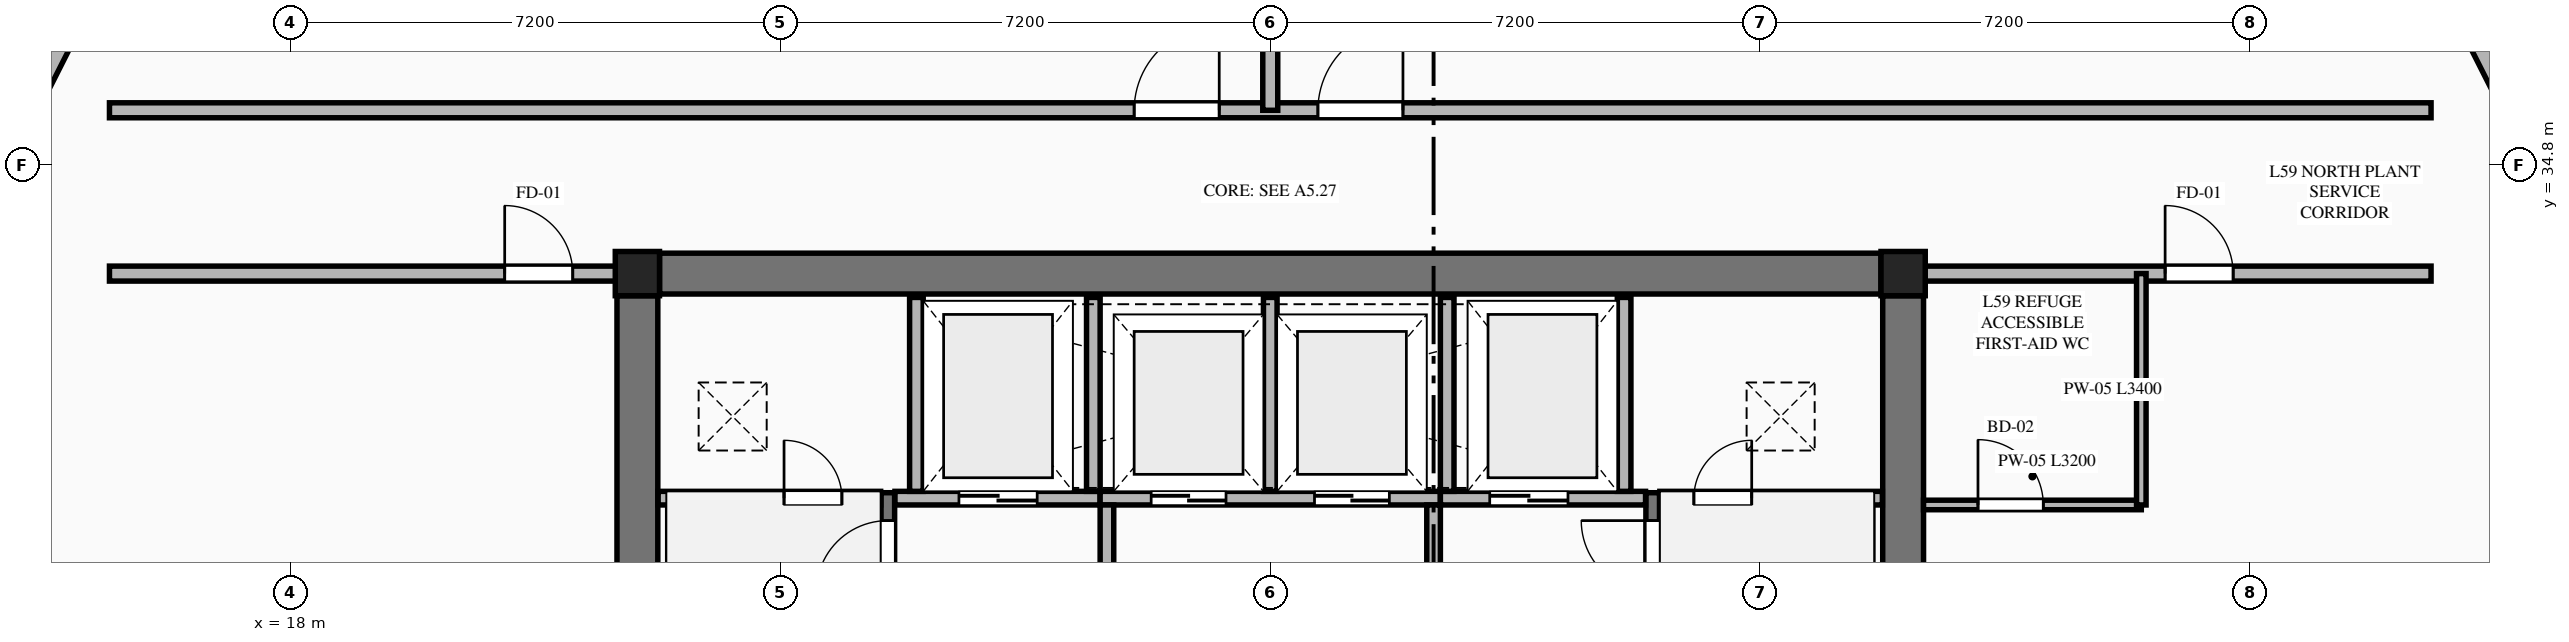
"""IFC4 building model, lengths in metres.
Left out: names, types, materials, properties, quantities, classifications, styles, units other than length and angle.
Written with IfcOpenShell. Run it as: python <this file> out.ifc"""

import sys

from ifc_helpers import new_model, si_unit, direction, frame, frame_2d, origin, origin_2d, place, context, subcontext, project, spatial, rectangle, extrude, element, fill, save


model = new_model("IFC4")
c1 = context("Model", 3, precision=1e-05, world=origin(), true_north=direction((0.0, 1.0)))
c2 = subcontext(c1, "Body", "Model", "MODEL_VIEW")
j1 = project(units=[si_unit("LENGTHUNIT", "METRE"), si_unit("PLANEANGLEUNIT", "RADIAN")], contexts=[c1])
p1 = place(None, origin())
s1 = spatial("IfcSite", under=j1, at=p1, CompositionType="ELEMENT")
p2 = place(p1, origin())
s2 = spatial("IfcBuilding", under=s1, at=p2, CompositionType="ELEMENT")
p3 = place(p2, frame((0.0, 0.0, 221.6)))
s3 = spatial("IfcBuildingStorey", under=s2, at=p3, CompositionType="ELEMENT", Elevation=221.6)
for number, where, z_axis, x_axis in (
    (1, (41.7, 33.2, 0.0), (0.0, 0.0, 1.0), (1.0, 0.0, 0.0)),
    (2, (23.1, 33.2, 0.0), (0.0, 0.0, 1.0), (1.0, 0.0, 0.0)),
):
    element("IfcColumn", number, at=place(p3, frame(where, z_axis=z_axis, x_axis=x_axis)), inside=s3, PredefinedType="COLUMN", context=c2, shape_type="SweptSolid", body=[
        extrude(rectangle(XDim=0.65, YDim=0.65, at=origin_2d()), origin(), (0.0, 0.0, 1.0), 5.4),
    ])
p4 = place(p3, frame((23.425, 33.2, 0.0), z_axis=(0.0, 0.0, 1.0), x_axis=(1.0, 0.0, 0.0)))
e3 = element("IfcWall", 3, at=p4, inside=s3, PredefinedType="SHEAR", context=c2, shape_type="SweptSolid", body=[
    extrude(rectangle(XDim=17.95, YDim=0.6, at=frame_2d((8.975, 0.0))), origin(), (0.0, 0.0, 1.0), 5.2),
])
p5 = place(p3, frame((23.1, 18.925, 0.0), z_axis=(0.0, 0.0, 1.0), x_axis=(0.0, 1.0, 0.0)))
e4 = element("IfcWall", 4, at=p5, inside=s3, PredefinedType="SHEAR", context=c2, shape_type="SweptSolid", body=[
    extrude(rectangle(XDim=13.95, YDim=0.6, at=frame_2d((6.975, 0.0))), origin(), (0.0, 0.0, 1.0), 5.2),
])
p6 = place(p5, frame((2.915, 0.0, 0.0)))
e5 = element("IfcOpeningElement", 5, at=p6, cuts=e4, PredefinedType="OPENING", context=c2, shape_type="SweptSolid", body=[
    extrude(rectangle(XDim=1.22, YDim=2.25, at=frame_2d((0.61, 1.125))), frame((0.0, 0.31, 0.0), z_axis=(0.0, -1.0, 0.0), x_axis=(1.0, 0.0, 0.0)), (0.0, 0.0, 1.0), 0.62),
])
p7 = place(p3, frame((41.7, 18.925, 0.0), z_axis=(0.0, 0.0, 1.0), x_axis=(0.0, 1.0, 0.0)))
e6 = element("IfcWall", 6, at=p7, inside=s3, PredefinedType="SHEAR", context=c2, shape_type="SweptSolid", body=[
    extrude(rectangle(XDim=13.95, YDim=0.6, at=frame_2d((6.975, 0.0))), origin(), (0.0, 0.0, 1.0), 5.2),
])
p8 = place(p7, frame((2.915, 0.0, 0.0)))
e7 = element("IfcOpeningElement", 7, at=p8, cuts=e6, PredefinedType="OPENING", context=c2, shape_type="SweptSolid", body=[
    extrude(rectangle(XDim=1.22, YDim=2.25, at=frame_2d((0.61, 1.125))), frame((0.0, 0.31, 0.0), z_axis=(0.0, -1.0, 0.0), x_axis=(1.0, 0.0, 0.0)), (0.0, 0.0, 1.0), 0.62),
])
p9 = place(p3, frame((26.78, 23.2, 0.0), z_axis=(0.0, 0.0, 1.0), x_axis=(0.0, 1.0, 0.0)))
e8 = element("IfcWall", 8, at=p9, inside=s3, PredefinedType="SHEAR", context=c2, shape_type="SweptSolid", body=[
    extrude(rectangle(XDim=6.78, YDim=0.2, at=frame_2d((3.39, 0.0))), origin(), (0.0, 0.0, 1.0), 5.4),
])
p10 = place(p9, frame((5.32, 0.0, 0.0)))
e9 = element("IfcOpeningElement", 9, at=p10, cuts=e8, PredefinedType="OPENING", context=c2, shape_type="SweptSolid", body=[
    extrude(rectangle(XDim=1.05, YDim=2.15, at=frame_2d((0.525, 1.075))), frame((0.0, 0.11, 0.0), z_axis=(0.0, -1.0, 0.0), x_axis=(1.0, 0.0, 0.0)), (0.0, 0.0, 1.0), 0.22),
])
p11 = place(p3, frame((38.02, 23.2, 0.0), z_axis=(0.0, 0.0, 1.0), x_axis=(0.0, 1.0, 0.0)))
e10 = element("IfcWall", 10, at=p11, inside=s3, PredefinedType="SHEAR", context=c2, shape_type="SweptSolid", body=[
    extrude(rectangle(XDim=6.78, YDim=0.2, at=frame_2d((3.39, 0.0))), origin(), (0.0, 0.0, 1.0), 5.4),
])
p12 = place(p11, frame((5.32, 0.0, 0.0)))
e11 = element("IfcOpeningElement", 11, at=p12, cuts=e10, PredefinedType="OPENING", context=c2, shape_type="SweptSolid", body=[
    extrude(rectangle(XDim=1.05, YDim=2.15, at=frame_2d((0.525, 1.075))), frame((0.0, 0.11, 0.0), z_axis=(0.0, -1.0, 0.0), x_axis=(1.0, 0.0, 0.0)), (0.0, 0.0, 1.0), 0.22),
])
p13 = place(p3, frame((23.405, 29.9, 0.0), z_axis=(0.0, 0.0, 1.0), x_axis=(1.0, 0.0, 0.0)))
e12 = element("IfcWall", 12, at=p13, inside=s3, PredefinedType="PLUMBINGWALL", context=c2, shape_type="SweptSolid", body=[
    extrude(rectangle(XDim=3.27, YDim=0.2, at=frame_2d((1.635, 0.0))), origin(), (0.0, 0.0, 1.0), 5.2),
])
p14 = place(p13, frame((1.85, 0.0, 0.0)))
e13 = element("IfcOpeningElement", 13, at=p14, cuts=e12, PredefinedType="OPENING", context=c2, shape_type="SweptSolid", body=[
    extrude(rectangle(XDim=0.85, YDim=2.05, at=frame_2d((0.425, 1.025))), frame((0.0, 0.11, 0.0), z_axis=(0.0, -1.0, 0.0), x_axis=(1.0, 0.0, 0.0)), (0.0, 0.0, 1.0), 0.22),
])
p15 = place(p3, frame((26.885, 29.9, 0.0), z_axis=(0.0, 0.0, 1.0), x_axis=(1.0, 0.0, 0.0)))
e14 = element("IfcWall", 14, at=p15, inside=s3, PredefinedType="PLUMBINGWALL", context=c2, shape_type="SweptSolid", body=[
    extrude(rectangle(XDim=3.015, YDim=0.2, at=frame_2d((1.507, 0.0))), origin(), (0.0, 0.0, 1.0), 5.2),
])
p16 = place(p15, frame((0.94, 0.0, 0.0)))
e15 = element("IfcOpeningElement", 15, at=p16, cuts=e14, PredefinedType="OPENING", context=c2, shape_type="SweptSolid", body=[
    extrude(rectangle(XDim=1.15, YDim=2.2, at=frame_2d((0.575, 1.1))), frame((0.0, 0.11, 0.0), z_axis=(0.0, -1.0, 0.0), x_axis=(1.0, 0.0, 0.0)), (0.0, 0.0, 1.0), 0.22),
])
p17 = place(p3, frame((29.9, 29.9, 0.0), z_axis=(0.0, 0.0, 1.0), x_axis=(1.0, 0.0, 0.0)))
e16 = element("IfcWall", 16, at=p17, inside=s3, PredefinedType="PLUMBINGWALL", context=c2, shape_type="SweptSolid", body=[
    extrude(rectangle(XDim=5.0, YDim=0.2, at=frame_2d((2.5, 0.0))), origin(), (0.0, 0.0, 1.0), 5.2),
])
p18 = place(p17, frame((0.75, 0.0, 0.0)))
e17 = element("IfcOpeningElement", 17, at=p18, cuts=e16, PredefinedType="OPENING", context=c2, shape_type="SweptSolid", body=[
    extrude(rectangle(XDim=1.1, YDim=2.2, at=frame_2d((0.55, 1.1))), frame((0.0, 0.11, 0.0), z_axis=(0.0, -1.0, 0.0), x_axis=(1.0, 0.0, 0.0)), (0.0, 0.0, 1.0), 0.22),
])
p19 = place(p17, frame((3.15, 0.0, 0.0)))
e18 = element("IfcOpeningElement", 18, at=p19, cuts=e16, PredefinedType="OPENING", context=c2, shape_type="SweptSolid", body=[
    extrude(rectangle(XDim=1.1, YDim=2.2, at=frame_2d((0.55, 1.1))), frame((0.0, 0.11, 0.0), z_axis=(0.0, -1.0, 0.0), x_axis=(1.0, 0.0, 0.0)), (0.0, 0.0, 1.0), 0.22),
])
p20 = place(p3, frame((34.9, 29.9, 0.0), z_axis=(0.0, 0.0, 1.0), x_axis=(1.0, 0.0, 0.0)))
e19 = element("IfcWall", 19, at=p20, inside=s3, PredefinedType="PLUMBINGWALL", context=c2, shape_type="SweptSolid", body=[
    extrude(rectangle(XDim=3.015, YDim=0.2, at=frame_2d((1.508, 0.0))), origin(), (0.0, 0.0, 1.0), 5.2),
])
p21 = place(p20, frame((0.725, 0.0, 0.0)))
e20 = element("IfcOpeningElement", 20, at=p21, cuts=e19, PredefinedType="OPENING", context=c2, shape_type="SweptSolid", body=[
    extrude(rectangle(XDim=1.15, YDim=2.2, at=frame_2d((0.575, 1.1))), frame((0.0, 0.11, 0.0), z_axis=(0.0, -1.0, 0.0), x_axis=(1.0, 0.0, 0.0)), (0.0, 0.0, 1.0), 0.22),
])
p22 = place(p3, frame((38.125, 29.9, 0.0), z_axis=(0.0, 0.0, 1.0), x_axis=(1.0, 0.0, 0.0)))
e21 = element("IfcWall", 21, at=p22, inside=s3, PredefinedType="PLUMBINGWALL", context=c2, shape_type="SweptSolid", body=[
    extrude(rectangle(XDim=3.27, YDim=0.2, at=frame_2d((1.635, 0.0))), origin(), (0.0, 0.0, 1.0), 5.2),
])
p23 = place(p22, frame((0.5, 0.0, 0.0)))
e22 = element("IfcOpeningElement", 22, at=p23, cuts=e21, PredefinedType="OPENING", context=c2, shape_type="SweptSolid", body=[
    extrude(rectangle(XDim=0.85, YDim=2.05, at=frame_2d((0.425, 1.025))), frame((0.0, 0.11, 0.0), z_axis=(0.0, -1.0, 0.0), x_axis=(1.0, 0.0, 0.0)), (0.0, 0.0, 1.0), 0.22),
])
for number, where, z_axis, x_axis in (
    (23, (27.2, 30.0, 0.0), (0.0, 0.0, 1.0), (0.0, 1.0, 0.0)),
    (24, (29.8, 30.0, 0.0), (0.0, 0.0, 1.0), (0.0, 1.0, 0.0)),
    (25, (32.4, 30.0, 0.0), (0.0, 0.0, 1.0), (0.0, 1.0, 0.0)),
    (26, (35.0, 30.0, 0.0), (0.0, 0.0, 1.0), (0.0, 1.0, 0.0)),
    (27, (37.6, 30.0, 0.0), (0.0, 0.0, 1.0), (0.0, 1.0, 0.0)),
):
    element("IfcWall", number, at=place(p3, frame(where, z_axis=z_axis, x_axis=x_axis)), inside=s3, PredefinedType="PLUMBINGWALL", context=c2, shape_type="SweptSolid", body=[
        extrude(rectangle(XDim=2.85, YDim=0.2, at=frame_2d((1.425, 0.0))), origin(), (0.0, 0.0, 1.0), 5.2),
    ])
p24 = place(p3, frame((30.0, 27.05, 0.0), z_axis=(0.0, 0.0, 1.0), x_axis=(0.0, 1.0, 0.0)))
e28 = element("IfcWall", 28, at=p24, inside=s3, PredefinedType="PLUMBINGWALL", context=c2, shape_type="SweptSolid", body=[
    extrude(rectangle(XDim=2.75, YDim=0.2, at=frame_2d((1.375, 0.0))), origin(), (0.0, 0.0, 1.0), 5.2),
])
p25 = place(p24, frame((0.85, 0.0, 0.0)))
e29 = element("IfcOpeningElement", 29, at=p25, cuts=e28, PredefinedType="OPENING", context=c2, shape_type="SweptSolid", body=[
    extrude(rectangle(XDim=1.0, YDim=2.15, at=frame_2d((0.5, 1.075))), frame((0.0, 0.11, 0.0), z_axis=(0.0, -1.0, 0.0), x_axis=(1.0, 0.0, 0.0)), (0.0, 0.0, 1.0), 0.22),
])
p26 = place(p3, frame((34.8, 27.05, 0.0), z_axis=(0.0, 0.0, 1.0), x_axis=(0.0, 1.0, 0.0)))
e30 = element("IfcWall", 30, at=p26, inside=s3, PredefinedType="PLUMBINGWALL", context=c2, shape_type="SweptSolid", body=[
    extrude(rectangle(XDim=2.75, YDim=0.2, at=frame_2d((1.375, 0.0))), origin(), (0.0, 0.0, 1.0), 5.2),
])
p27 = place(p26, frame((0.85, 0.0, 0.0)))
e31 = element("IfcOpeningElement", 31, at=p27, cuts=e30, PredefinedType="OPENING", context=c2, shape_type="SweptSolid", body=[
    extrude(rectangle(XDim=1.0, YDim=2.15, at=frame_2d((0.5, 1.075))), frame((0.0, 0.11, 0.0), z_axis=(0.0, -1.0, 0.0), x_axis=(1.0, 0.0, 0.0)), (0.0, 0.0, 1.0), 0.22),
])
p28 = place(p3, frame((15.342, 33.2, 0.0), z_axis=(0.0, 0.0, 1.0), x_axis=(1.0, 0.0, 0.0)))
e32 = element("IfcWall", 32, at=p28, inside=s3, PredefinedType="PARTITIONING", context=c2, shape_type="SweptSolid", body=[
    extrude(rectangle(XDim=7.458, YDim=0.22, at=frame_2d((3.729, 0.0))), origin(), (0.0, 0.0, 1.0), 5.2),
])
p29 = place(p28, frame((5.808, 0.0, 0.0)))
e33 = element("IfcOpeningElement", 33, at=p29, cuts=e32, PredefinedType="OPENING", context=c2, shape_type="SweptSolid", body=[
    extrude(rectangle(XDim=1.0, YDim=2.15, at=frame_2d((0.5, 1.075))), frame((0.0, 0.12, 0.0), z_axis=(0.0, -1.0, 0.0), x_axis=(1.0, 0.0, 0.0)), (0.0, 0.0, 1.0), 0.24),
])
p30 = place(p3, frame((42.0, 33.2, 0.0), z_axis=(0.0, 0.0, 1.0), x_axis=(1.0, 0.0, 0.0)))
e34 = element("IfcWall", 34, at=p30, inside=s3, PredefinedType="PARTITIONING", context=c2, shape_type="SweptSolid", body=[
    extrude(rectangle(XDim=7.458, YDim=0.22, at=frame_2d((3.729, 0.0))), origin(), (0.0, 0.0, 1.0), 5.2),
])
p31 = place(p30, frame((3.55, 0.0, 0.0)))
e35 = element("IfcOpeningElement", 35, at=p31, cuts=e34, PredefinedType="OPENING", context=c2, shape_type="SweptSolid", body=[
    extrude(rectangle(XDim=1.0, YDim=2.15, at=frame_2d((0.5, 1.075))), frame((0.0, 0.12, 0.0), z_axis=(0.0, -1.0, 0.0), x_axis=(1.0, 0.0, 0.0)), (0.0, 0.0, 1.0), 0.24),
])
p32 = place(p3, frame((42.0, 29.8, 0.0), z_axis=(0.0, 0.0, 1.0), x_axis=(1.0, 0.0, 0.0)))
e36 = element("IfcWall", 36, at=p32, inside=s3, PredefinedType="PLUMBINGWALL", context=c2, shape_type="SweptSolid", body=[
    extrude(rectangle(XDim=3.2, YDim=0.14, at=frame_2d((1.6, 0.0))), origin(), (0.0, 0.0, 1.0), 5.2),
])
p33 = place(p32, frame((0.8, 0.0, 0.0)))
e37 = element("IfcOpeningElement", 37, at=p33, cuts=e36, PredefinedType="OPENING", context=c2, shape_type="SweptSolid", body=[
    extrude(rectangle(XDim=0.96, YDim=2.15, at=frame_2d((0.48, 1.075))), frame((0.0, 0.08, 0.0), z_axis=(0.0, -1.0, 0.0), x_axis=(1.0, 0.0, 0.0)), (0.0, 0.0, 1.0), 0.16),
])
p34 = place(p3, frame((45.2, 29.8, 0.0), z_axis=(0.0, 0.0, 1.0), x_axis=(0.0, 1.0, 0.0)))
e38 = element("IfcWall", 38, at=p34, inside=s3, PredefinedType="PLUMBINGWALL", context=c2, shape_type="SweptSolid", body=[
    extrude(rectangle(XDim=3.4, YDim=0.14, at=frame_2d((1.7, 0.0))), origin(), (0.0, 0.0, 1.0), 5.2),
])
p35 = place(p3, frame((15.342, 35.6, 0.0), z_axis=(0.0, 0.0, 1.0), x_axis=(1.0, 0.0, 0.0)))
e39 = element("IfcWall", 39, at=p35, inside=s3, PredefinedType="PARTITIONING", context=c2, shape_type="SweptSolid", body=[
    extrude(rectangle(XDim=34.116, YDim=0.22, at=frame_2d((17.058, 0.0))), origin(), (0.0, 0.0, 1.0), 5.2),
])
p36 = place(p35, frame((15.058, 0.0, 0.0)))
e40 = element("IfcOpeningElement", 40, at=p36, cuts=e39, PredefinedType="OPENING", context=c2, shape_type="SweptSolid", body=[
    extrude(rectangle(XDim=1.25, YDim=2.25, at=frame_2d((0.625, 1.125))), frame((0.0, 0.12, 0.0), z_axis=(0.0, -1.0, 0.0), x_axis=(1.0, 0.0, 0.0)), (0.0, 0.0, 1.0), 0.24),
])
p37 = place(p35, frame((17.758, 0.0, 0.0)))
e41 = element("IfcOpeningElement", 41, at=p37, cuts=e39, PredefinedType="OPENING", context=c2, shape_type="SweptSolid", body=[
    extrude(rectangle(XDim=1.25, YDim=2.25, at=frame_2d((0.625, 1.125))), frame((0.0, 0.12, 0.0), z_axis=(0.0, -1.0, 0.0), x_axis=(1.0, 0.0, 0.0)), (0.0, 0.0, 1.0), 0.24),
])
p38 = place(p3, frame((32.4, 35.6, 0.0), z_axis=(0.0, 0.0, 1.0), x_axis=(0.0, 1.0, 0.0)))
e42 = element("IfcWall", 42, at=p38, inside=s3, PredefinedType="PARTITIONING", context=c2, shape_type="SweptSolid", body=[
    extrude(rectangle(XDim=8.1, YDim=0.22, at=frame_2d((4.05, 0.0))), origin(), (0.0, 0.0, 1.0), 5.2),
])
for number, where, z_axis, x_axis in (
    (43, (51.7, 33.631, 0.0), (0.0, 0.0, 1.0), (-0.451, 0.892, 0.0)),
    (44, (15.397, 38.173, 0.0), (0.0, 0.0, 1.0), (-0.451, -0.892, 0.0)),
):
    element("IfcWall", number, at=place(p3, frame(where, z_axis=z_axis, x_axis=x_axis)), inside=s3, PredefinedType="STANDARD", context=c2, shape_type="SweptSolid", body=[
        extrude(rectangle(XDim=5.09, YDim=0.36, at=frame_2d((2.545, 0.0))), origin(), (0.0, 0.0, 1.0), 3.79),
    ])
p39 = place(p10, origin())
e45 = element("IfcDoor", 45, at=p39, inside=s3, OperationType="SINGLE_SWING_LEFT", PredefinedType="DOOR", context=c2, shape_type="SweptSolid", body=[
    extrude(rectangle(XDim=1.05, YDim=2.15, at=frame_2d((0.525, 1.075))), frame((0.0, 0.025, 0.0), z_axis=(0.0, -1.0, 0.0), x_axis=(1.0, 0.0, 0.0)), (0.0, 0.0, 1.0), 0.05),
])
fill(e9, e45)
p40 = place(p12, origin())
e46 = element("IfcDoor", 46, at=p40, inside=s3, OperationType="SINGLE_SWING_RIGHT", PredefinedType="DOOR", context=c2, shape_type="SweptSolid", body=[
    extrude(rectangle(XDim=1.05, YDim=2.15, at=frame_2d((0.525, 1.075))), frame((0.0, 0.025, 0.0), z_axis=(0.0, -1.0, 0.0), x_axis=(1.0, 0.0, 0.0)), (0.0, 0.0, 1.0), 0.05),
])
fill(e11, e46)
p41 = place(p14, origin())
e47 = element("IfcDoor", 47, at=p41, inside=s3, OperationType="SINGLE_SWING_LEFT", PredefinedType="DOOR", context=c2, shape_type="SweptSolid", body=[
    extrude(rectangle(XDim=0.85, YDim=2.05, at=frame_2d((0.425, 1.025))), frame((0.0, 0.025, 0.0), z_axis=(0.0, -1.0, 0.0), x_axis=(1.0, 0.0, 0.0)), (0.0, 0.0, 1.0), 0.05),
])
fill(e13, e47)
p42 = place(p23, origin())
e48 = element("IfcDoor", 48, at=p42, inside=s3, OperationType="SINGLE_SWING_RIGHT", PredefinedType="DOOR", context=c2, shape_type="SweptSolid", body=[
    extrude(rectangle(XDim=0.85, YDim=2.05, at=frame_2d((0.425, 1.025))), frame((0.0, 0.025, 0.0), z_axis=(0.0, -1.0, 0.0), x_axis=(1.0, 0.0, 0.0)), (0.0, 0.0, 1.0), 0.05),
])
fill(e22, e48)
p43 = place(p16, origin())
e49 = element("IfcDoor", 49, at=p43, inside=s3, OperationType="DOUBLE_DOOR_SLIDING", PredefinedType="DOOR", context=c2, shape_type="SweptSolid", body=[
    extrude(rectangle(XDim=1.15, YDim=2.2, at=frame_2d((0.575, 1.1))), frame((0.0, 0.025, 0.0), z_axis=(0.0, -1.0, 0.0), x_axis=(1.0, 0.0, 0.0)), (0.0, 0.0, 1.0), 0.05),
])
fill(e15, e49)
p44 = place(p21, origin())
e50 = element("IfcDoor", 50, at=p44, inside=s3, OperationType="DOUBLE_DOOR_SLIDING", PredefinedType="DOOR", context=c2, shape_type="SweptSolid", body=[
    extrude(rectangle(XDim=1.15, YDim=2.2, at=frame_2d((0.575, 1.1))), frame((0.0, 0.025, 0.0), z_axis=(0.0, -1.0, 0.0), x_axis=(1.0, 0.0, 0.0)), (0.0, 0.0, 1.0), 0.05),
])
fill(e20, e50)
p45 = place(p18, origin())
e51 = element("IfcDoor", 51, at=p45, inside=s3, OperationType="DOUBLE_DOOR_SLIDING", PredefinedType="DOOR", context=c2, shape_type="SweptSolid", body=[
    extrude(rectangle(XDim=1.1, YDim=2.2, at=frame_2d((0.55, 1.1))), frame((0.0, 0.025, 0.0), z_axis=(0.0, -1.0, 0.0), x_axis=(1.0, 0.0, 0.0)), (0.0, 0.0, 1.0), 0.05),
])
fill(e17, e51)
p46 = place(p19, origin())
e52 = element("IfcDoor", 52, at=p46, inside=s3, OperationType="DOUBLE_DOOR_SLIDING", PredefinedType="DOOR", context=c2, shape_type="SweptSolid", body=[
    extrude(rectangle(XDim=1.1, YDim=2.2, at=frame_2d((0.55, 1.1))), frame((0.0, 0.025, 0.0), z_axis=(0.0, -1.0, 0.0), x_axis=(1.0, 0.0, 0.0)), (0.0, 0.0, 1.0), 0.05),
])
fill(e18, e52)
p47 = place(p33, origin())
e53 = element("IfcDoor", 53, at=p47, inside=s3, OperationType="SINGLE_SWING_LEFT", PredefinedType="DOOR", context=c2, shape_type="SweptSolid", body=[
    extrude(rectangle(XDim=0.96, YDim=2.15, at=frame_2d((0.48, 1.075))), frame((0.0, 0.025, 0.0), z_axis=(0.0, -1.0, 0.0), x_axis=(1.0, 0.0, 0.0)), (0.0, 0.0, 1.0), 0.05),
])
fill(e37, e53)
p48 = place(p29, origin())
e54 = element("IfcDoor", 54, at=p48, inside=s3, OperationType="SINGLE_SWING_LEFT", PredefinedType="DOOR", context=c2, shape_type="SweptSolid", body=[
    extrude(rectangle(XDim=1.0, YDim=2.15, at=frame_2d((0.5, 1.075))), frame((0.0, 0.025, 0.0), z_axis=(0.0, -1.0, 0.0), x_axis=(1.0, 0.0, 0.0)), (0.0, 0.0, 1.0), 0.05),
])
fill(e33, e54)
p49 = place(p31, origin())
e55 = element("IfcDoor", 55, at=p49, inside=s3, OperationType="SINGLE_SWING_LEFT", PredefinedType="DOOR", context=c2, shape_type="SweptSolid", body=[
    extrude(rectangle(XDim=1.0, YDim=2.15, at=frame_2d((0.5, 1.075))), frame((0.0, 0.025, 0.0), z_axis=(0.0, -1.0, 0.0), x_axis=(1.0, 0.0, 0.0)), (0.0, 0.0, 1.0), 0.05),
])
fill(e35, e55)
p50 = place(p36, origin())
e56 = element("IfcDoor", 56, at=p50, inside=s3, OperationType="SINGLE_SWING_RIGHT", PredefinedType="DOOR", context=c2, shape_type="SweptSolid", body=[
    extrude(rectangle(XDim=1.25, YDim=2.25, at=frame_2d((0.625, 1.125))), frame((0.0, 0.025, 0.0), z_axis=(0.0, -1.0, 0.0), x_axis=(1.0, 0.0, 0.0)), (0.0, 0.0, 1.0), 0.05),
])
fill(e40, e56)
p51 = place(p37, origin())
e57 = element("IfcDoor", 57, at=p51, inside=s3, OperationType="SINGLE_SWING_RIGHT", PredefinedType="DOOR", context=c2, shape_type="SweptSolid", body=[
    extrude(rectangle(XDim=1.25, YDim=2.25, at=frame_2d((0.625, 1.125))), frame((0.0, 0.025, 0.0), z_axis=(0.0, -1.0, 0.0), x_axis=(1.0, 0.0, 0.0)), (0.0, 0.0, 1.0), 0.05),
])
fill(e41, e57)
save(model, sys.argv[1])
